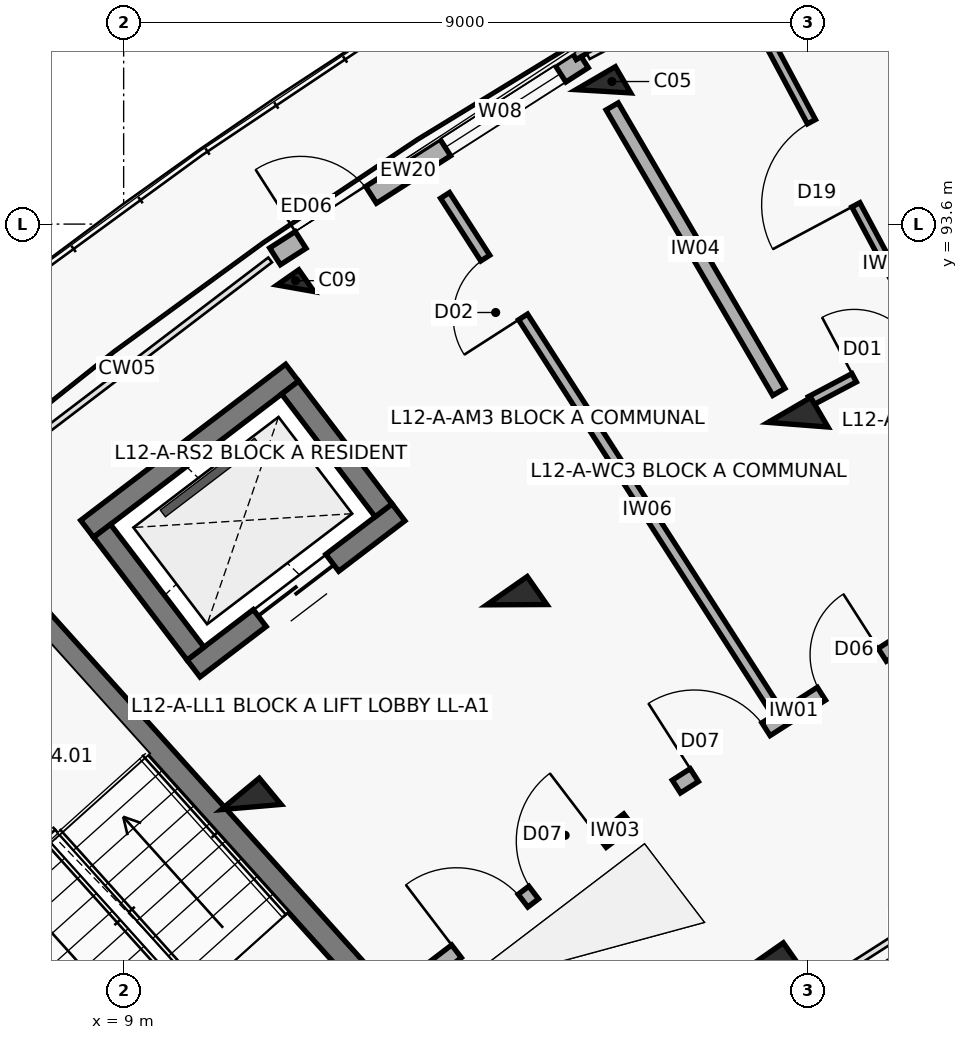
"""IFC4 building model, lengths in metres.
Left out: names, types, materials, properties, quantities, classifications, styles, units other than length and angle.
Written with IfcOpenShell. Run it as: python <this file> out.ifc"""

import sys

from ifc_helpers import new_model, si_unit, direction, frame, frame_2d, origin, origin_2d, place, context, subcontext, project, spatial, rectangle, extrude, element, fill, save


model = new_model("IFC4")
c1 = context("Model", 3, precision=1e-05, world=origin(), true_north=direction((0.0, 1.0)))
c2 = subcontext(c1, "Body", "Model", "MODEL_VIEW")
j1 = project(units=[si_unit("LENGTHUNIT", "METRE"), si_unit("PLANEANGLEUNIT", "RADIAN")], contexts=[c1])
p1 = place(None, origin())
s1 = spatial("IfcSite", under=j1, at=p1, CompositionType="ELEMENT")
p2 = place(p1, origin())
s2 = spatial("IfcBuilding", under=s1, at=p2, CompositionType="ELEMENT")
p3 = place(p2, frame((0.0, 0.0, 39.1)))
s3 = spatial("IfcBuildingStorey", under=s2, at=p3, CompositionType="ELEMENT", Elevation=39.1)
for number, where, z_axis, x_axis in (
    (1, (10.678, 85.93, 0.0), (0.0, 0.0, 1.0), (-0.638, 0.77, 0.0)),
    (2, (17.542, 83.773, 0.0), (0.0, 0.0, 1.0), (-0.573, 0.82, 0.0)),
    (3, (14.172, 88.592, 0.0), (0.0, 0.0, 1.0), (-0.573, 0.82, 0.0)),
):
    element("IfcColumn", number, at=place(p3, frame(where, z_axis=z_axis, x_axis=x_axis)), inside=s3, PredefinedType="COLUMN", context=c2, shape_type="SweptSolid", body=[
        extrude(rectangle(XDim=0.45, YDim=0.65, at=origin_2d()), origin(), (0.0, 0.0, 1.0), 3.1),
    ])
p4 = place(p3, frame((11.261, 92.755, 0.0), z_axis=(0.0, 0.0, 1.0), x_axis=(-0.573004420611, 0.819552276527, 0.0)))
e4 = element("IfcColumn", 4, at=p4, inside=s3, PredefinedType="COLUMN", context=c2, shape_type="SweptSolid", body=[
    extrude(rectangle(XDim=0.35, YDim=0.35, at=origin_2d()), origin(), (0.0, 0.0, 1.0), 3.1),
])
p5 = place(p3, frame((17.873, 90.96, 0.0), z_axis=(0.0, 0.0, 1.0), x_axis=(-0.504226211181, 0.863571611366, 0.0)))
e5 = element("IfcColumn", 5, at=p5, inside=s3, PredefinedType="COLUMN", context=c2, shape_type="SweptSolid", body=[
    extrude(rectangle(XDim=0.45, YDim=0.65, at=origin_2d()), origin(), (0.0, 0.0, 1.0), 3.1),
])
p6 = place(p3, frame((15.311, 95.347, 0.0), z_axis=(0.0, 0.0, 1.0), x_axis=(-0.504226211181, 0.863571611366, 0.0)))
e6 = element("IfcColumn", 6, at=p6, inside=s3, PredefinedType="COLUMN", context=c2, shape_type="SweptSolid", body=[
    extrude(rectangle(XDim=0.4, YDim=0.6, at=origin_2d()), origin(), (0.0, 0.0, 1.0), 3.1),
])
p7 = place(p3, frame((10.992, 93.176, 0.0), z_axis=(0.0, 0.0, 1.0), x_axis=(0.84226218024, 0.539068103061, 0.0)))
e7 = element("IfcWall", 7, at=p7, inside=s3, PredefinedType="SOLIDWALL", context=c2, shape_type="SweptSolid", body=[
    extrude(rectangle(XDim=4.809, YDim=0.262, at=frame_2d((2.404, 0.0))), origin(), (0.0, 0.0, 1.0), 2.25),
])
p8 = place(p7, frame((0.4, 0.0, 0.0)))
e8 = element("IfcOpeningElement", 8, at=p8, cuts=e7, PredefinedType="OPENING", context=c2, shape_type="SweptSolid", body=[
    extrude(rectangle(XDim=1.1, YDim=2.15, at=frame_2d((0.55, 1.075))), frame((0.0, 0.141, 0.0), z_axis=(0.0, -1.0, 0.0), x_axis=(1.0, 0.0, 0.0)), (0.0, 0.0, 1.0), 0.282),
])
p9 = place(p7, frame((2.659, 0.0, 0.35)))
e9 = element("IfcOpeningElement", 9, at=p9, cuts=e7, PredefinedType="OPENING", context=c2, shape_type="SweptSolid", body=[
    extrude(rectangle(XDim=1.8, YDim=1.65, at=frame_2d((0.9, 0.825))), frame((0.0, 0.141, 0.0), z_axis=(0.0, -1.0, 0.0), x_axis=(1.0, 0.0, 0.0)), (0.0, 0.0, 1.0), 0.282),
])
p10 = place(p3, frame((15.039, 95.813, 0.0), z_axis=(0.0, 0.0, 1.0), x_axis=(-0.504228145431, 0.863570481985, 0.0)))
e10 = element("IfcWall", 10, at=p10, inside=s3, PredefinedType="PARAPET", context=c2, shape_type="SweptSolid", body=[
    extrude(rectangle(XDim=1.53, YDim=0.195, at=frame_2d((0.765, 0.0))), origin(), (0.0, 0.0, 1.0), 2.25),
])
p11 = place(p3, frame((12.345, 83.461, 0.0), z_axis=(0.0, 0.0, 1.0), x_axis=(-0.668868253964, 0.743380964808, 0.0)))
e11 = element("IfcWall", 11, at=p11, inside=s3, PredefinedType="SHEAR", context=c2, shape_type="SweptSolid", body=[
    extrude(rectangle(XDim=7.69, YDim=0.3, at=frame_2d((3.845, 0.0))), origin(), (0.0, 0.0, 1.0), 3.1),
])
p12 = place(p3, frame((9.691, 81.073, 0.0), z_axis=(0.0, 0.0, 1.0), x_axis=(-0.668885797871, 0.743365179038, 0.0)))
e12 = element("IfcWall", 12, at=p12, inside=s3, PredefinedType="SHEAR", context=c2, shape_type="SweptSolid", body=[
    extrude(rectangle(XDim=7.69, YDim=0.3, at=frame_2d((3.845, 0.0))), origin(), (0.0, 0.0, 1.0), 3.1),
])
p13 = place(p3, frame((12.616, 89.807, 0.0), z_axis=(0.0, 0.0, 1.0), x_axis=(-0.795474703455, -0.605986795371, 0.0)))
e13 = element("IfcWall", 13, at=p13, inside=s3, PredefinedType="SHEAR", context=c2, shape_type="SweptSolid", body=[
    extrude(rectangle(XDim=3.39, YDim=0.28, at=frame_2d((1.695, 0.0))), origin(), (0.0, 0.0, 1.0), 3.1),
])
p14 = place(p13, frame((1.095, 0.0, 0.0)))
e14 = element("IfcOpeningElement", 14, at=p14, cuts=e13, PredefinedType="OPENING", context=c2, shape_type="SweptSolid", body=[
    extrude(rectangle(XDim=1.2, YDim=2.15, at=frame_2d((0.6, 1.075))), frame((0.0, 0.15, 0.0), z_axis=(0.0, -1.0, 0.0), x_axis=(1.0, 0.0, 0.0)), (0.0, 0.0, 1.0), 0.3),
])
p15 = place(p3, frame((11.216, 91.645, 0.0), z_axis=(0.0, 0.0, 1.0), x_axis=(-0.795439986025, -0.606032365994, 0.0)))
e15 = element("IfcWall", 15, at=p15, inside=s3, PredefinedType="SHEAR", context=c2, shape_type="SweptSolid", body=[
    extrude(rectangle(XDim=3.39, YDim=0.28, at=frame_2d((1.695, 0.0))), origin(), (0.0, 0.0, 1.0), 3.1),
])
p16 = place(p3, frame((12.42, 89.834, 0.0), z_axis=(0.0, 0.0, 1.0), x_axis=(-0.605948992168, 0.795503500238, 0.0)))
e16 = element("IfcWall", 16, at=p16, inside=s3, PredefinedType="SHEAR", context=c2, shape_type="SweptSolid", body=[
    extrude(rectangle(XDim=2.03, YDim=0.28, at=frame_2d((1.015, 0.0))), origin(), (0.0, 0.0, 1.0), 3.1),
])
p17 = place(p3, frame((9.946, 87.949, 0.0), z_axis=(0.0, 0.0, 1.0), x_axis=(-0.605891019062, 0.795547656033, 0.0)))
e17 = element("IfcWall", 17, at=p17, inside=s3, PredefinedType="SHEAR", context=c2, shape_type="SweptSolid", body=[
    extrude(rectangle(XDim=2.03, YDim=0.28, at=frame_2d((1.015, 0.0))), origin(), (0.0, 0.0, 1.0), 3.1),
])
p18 = place(p3, frame((13.021, 83.759, 0.0), z_axis=(0.0, 0.0, 1.0), x_axis=(0.795498026433, 0.605956178235, 0.0)))
e18 = element("IfcWall", 18, at=p18, inside=s3, PredefinedType="SOLIDWALL", context=c2, shape_type="SweptSolid", body=[
    extrude(rectangle(XDim=3.296, YDim=0.21, at=frame_2d((1.648, 0.0))), origin(), (0.0, 0.0, 1.0), 2.08),
])
p19 = place(p18, frame((0.45, 0.0, 0.0)))
e19 = element("IfcOpeningElement", 19, at=p19, cuts=e18, PredefinedType="OPENING", context=c2, shape_type="SweptSolid", body=[
    extrude(rectangle(XDim=1.1, YDim=2.15, at=frame_2d((0.55, 1.075))), frame((0.0, 0.115, 0.0), z_axis=(0.0, -1.0, 0.0), x_axis=(1.0, 0.0, 0.0)), (0.0, 0.0, 1.0), 0.23),
])
p20 = place(p18, frame((1.726, 0.0, 0.0)))
e20 = element("IfcOpeningElement", 20, at=p20, cuts=e18, PredefinedType="OPENING", context=c2, shape_type="SweptSolid", body=[
    extrude(rectangle(XDim=1.12, YDim=2.15, at=frame_2d((0.56, 1.075))), frame((0.0, 0.115, 0.0), z_axis=(0.0, -1.0, 0.0), x_axis=(1.0, 0.0, 0.0)), (0.0, 0.0, 1.0), 0.23),
])
p21 = place(p3, frame((16.272, 86.199, 0.0), z_axis=(0.0, 0.0, 1.0), x_axis=(0.842257205985, 0.539075874963, 0.0)))
e21 = element("IfcWall", 21, at=p21, inside=s3, PredefinedType="SOLIDWALL", context=c2, shape_type="SweptSolid", body=[
    extrude(rectangle(XDim=3.436, YDim=0.2, at=frame_2d((1.718, 0.0))), origin(), (0.0, 0.0, 1.0), 2.08),
])
p22 = place(p21, frame((0.28, 0.0, 0.0)))
e22 = element("IfcOpeningElement", 22, at=p22, cuts=e21, PredefinedType="OPENING", context=c2, shape_type="SweptSolid", body=[
    extrude(rectangle(XDim=1.12, YDim=2.15, at=frame_2d((0.56, 1.075))), frame((0.0, 0.11, 0.0), z_axis=(0.0, -1.0, 0.0), x_axis=(1.0, 0.0, 0.0)), (0.0, 0.0, 1.0), 0.22),
])
p23 = place(p21, frame((2.266, 0.0, 0.0)))
e23 = element("IfcOpeningElement", 23, at=p23, cuts=e21, PredefinedType="OPENING", context=c2, shape_type="SweptSolid", body=[
    extrude(rectangle(XDim=0.95, YDim=2.1, at=frame_2d((0.475, 1.05))), frame((0.0, 0.11, 0.0), z_axis=(0.0, -1.0, 0.0), x_axis=(1.0, 0.0, 0.0)), (0.0, 0.0, 1.0), 0.22),
])
p24 = place(p3, frame((17.524, 87.288, 0.0), z_axis=(0.0, 0.0, 1.0), x_axis=(-0.540338452216, 0.841447774408, 0.0)))
e24 = element("IfcWall", 24, at=p24, inside=s3, PredefinedType="PARTITIONING", context=c2, shape_type="SweptSolid", body=[
    extrude(rectangle(XDim=7.95, YDim=0.14, at=frame_2d((3.975, 0.0))), origin(), (0.0, 0.0, 1.0), 2.08),
])
p25 = place(p24, frame((6.05, 0.0, 0.0)))
e25 = element("IfcOpeningElement", 25, at=p25, cuts=e24, PredefinedType="OPENING", context=c2, shape_type="SweptSolid", body=[
    extrude(rectangle(XDim=0.92, YDim=2.1, at=frame_2d((0.46, 1.05))), frame((0.0, 0.08, 0.0), z_axis=(0.0, -1.0, 0.0), x_axis=(1.0, 0.0, 0.0)), (0.0, 0.0, 1.0), 0.16),
])
p26 = place(p3, frame((18.037, 91.273, 0.0), z_axis=(0.0, 0.0, 1.0), x_axis=(0.883441603894, 0.468541281543, 0.0)))
e26 = element("IfcWall", 26, at=p26, inside=s3, PredefinedType="PARTITIONING", context=c2, shape_type="SweptSolid", body=[
    extrude(rectangle(XDim=3.81, YDim=0.125, at=frame_2d((1.905, 0.0))), origin(), (0.0, 0.0, 1.0), 2.08),
])
p27 = place(p26, frame((0.65, 0.0, 0.0)))
e27 = element("IfcOpeningElement", 27, at=p27, cuts=e26, PredefinedType="OPENING", context=c2, shape_type="SweptSolid", body=[
    extrude(rectangle(XDim=0.9, YDim=2.1, at=frame_2d((0.45, 1.05))), frame((0.0, 0.073, 0.0), z_axis=(0.0, -1.0, 0.0), x_axis=(1.0, 0.0, 0.0)), (0.0, 0.0, 1.0), 0.145),
])
p28 = place(p26, frame((2.28, 0.0, 0.0)))
e28 = element("IfcOpeningElement", 28, at=p28, cuts=e26, PredefinedType="OPENING", context=c2, shape_type="SweptSolid", body=[
    extrude(rectangle(XDim=0.88, YDim=2.1, at=frame_2d((0.44, 1.05))), frame((0.0, 0.073, 0.0), z_axis=(0.0, -1.0, 0.0), x_axis=(1.0, 0.0, 0.0)), (0.0, 0.0, 1.0), 0.145),
])
p29 = place(p3, frame((19.46, 92.306, 0.0), z_axis=(0.0, 0.0, 1.0), x_axis=(-0.471228378949, 0.88201123285, 0.0)))
e29 = element("IfcWall", 29, at=p29, inside=s3, PredefinedType="PARTITIONING", context=c2, shape_type="SweptSolid", body=[
    extrude(rectangle(XDim=4.75, YDim=0.12, at=frame_2d((2.375, 0.0))), origin(), (0.0, 0.0, 1.0), 2.08),
])
p30 = place(p29, frame((1.755, 0.0, 0.0)))
e30 = element("IfcOpeningElement", 30, at=p30, cuts=e29, PredefinedType="OPENING", context=c2, shape_type="SweptSolid", body=[
    extrude(rectangle(XDim=1.24, YDim=2.1, at=frame_2d((0.62, 1.05))), frame((0.0, 0.07, 0.0), z_axis=(0.0, -1.0, 0.0), x_axis=(1.0, 0.0, 0.0)), (0.0, 0.0, 1.0), 0.14),
])
p31 = place(p3, frame((17.621, 91.392, 0.0), z_axis=(0.0, 0.0, 1.0), x_axis=(-0.504216452091, 0.863577309475, 0.0)))
e31 = element("IfcWall", 31, at=p31, inside=s3, PredefinedType="SOLIDWALL", context=c2, shape_type="SweptSolid", body=[
    extrude(rectangle(XDim=4.35, YDim=0.185, at=frame_2d((2.175, 0.0))), origin(), (0.0, 0.0, 1.0), 2.08),
])
p32 = place(p8, origin())
e32 = element("IfcDoor", 32, at=p32, inside=s3, OperationType="SINGLE_SWING_LEFT", PredefinedType="DOOR", context=c2, shape_type="SweptSolid", body=[
    extrude(rectangle(XDim=1.1, YDim=2.15, at=frame_2d((0.55, 1.075))), frame((0.0, 0.025, 0.0), z_axis=(0.0, -1.0, 0.0), x_axis=(1.0, 0.0, 0.0)), (0.0, 0.0, 1.0), 0.05),
])
fill(e8, e32)
p33 = place(p9, origin())
e33 = element("IfcWindow", 33, at=p33, inside=s3, PartitioningType="TRIPLE_PANEL_VERTICAL", PredefinedType="WINDOW", context=c2, shape_type="SweptSolid", body=[
    extrude(rectangle(XDim=1.8, YDim=1.65, at=frame_2d((0.9, 0.825))), frame((0.0, 0.03, 0.0), z_axis=(0.0, -1.0, 0.0), x_axis=(1.0, 0.0, 0.0)), (0.0, 0.0, 1.0), 0.06),
])
fill(e9, e33)
p34 = place(p14, origin())
e34 = element("IfcDoor", 34, at=p34, inside=s3, OperationType="DOUBLE_DOOR_SLIDING", PredefinedType="DOOR", context=c2, shape_type="SweptSolid", body=[
    extrude(rectangle(XDim=1.2, YDim=2.15, at=frame_2d((0.6, 1.075))), frame((0.0, 0.025, 0.0), z_axis=(0.0, -1.0, 0.0), x_axis=(1.0, 0.0, 0.0)), (0.0, 0.0, 1.0), 0.05),
])
fill(e14, e34)
p35 = place(p19, origin())
e35 = element("IfcDoor", 35, at=p35, inside=s3, OperationType="SINGLE_SWING_LEFT", PredefinedType="DOOR", context=c2, shape_type="SweptSolid", body=[
    extrude(rectangle(XDim=1.1, YDim=2.15, at=frame_2d((0.55, 1.075))), frame((0.0, 0.025, 0.0), z_axis=(0.0, -1.0, 0.0), x_axis=(1.0, 0.0, 0.0)), (0.0, 0.0, 1.0), 0.05),
])
fill(e19, e35)
p36 = place(p20, origin())
e36 = element("IfcDoor", 36, at=p36, inside=s3, OperationType="SINGLE_SWING_RIGHT", PredefinedType="DOOR", context=c2, shape_type="SweptSolid", body=[
    extrude(rectangle(XDim=1.12, YDim=2.15, at=frame_2d((0.56, 1.075))), frame((0.0, 0.025, 0.0), z_axis=(0.0, -1.0, 0.0), x_axis=(1.0, 0.0, 0.0)), (0.0, 0.0, 1.0), 0.05),
])
fill(e20, e36)
p37 = place(p22, origin())
e37 = element("IfcDoor", 37, at=p37, inside=s3, OperationType="SINGLE_SWING_LEFT", PredefinedType="DOOR", context=c2, shape_type="SweptSolid", body=[
    extrude(rectangle(XDim=1.12, YDim=2.15, at=frame_2d((0.56, 1.075))), frame((0.0, 0.025, 0.0), z_axis=(0.0, -1.0, 0.0), x_axis=(1.0, 0.0, 0.0)), (0.0, 0.0, 1.0), 0.05),
])
fill(e22, e37)
p38 = place(p23, origin())
e38 = element("IfcDoor", 38, at=p38, inside=s3, OperationType="SINGLE_SWING_RIGHT", PredefinedType="DOOR", context=c2, shape_type="SweptSolid", body=[
    extrude(rectangle(XDim=0.95, YDim=2.1, at=frame_2d((0.475, 1.05))), frame((0.0, 0.025, 0.0), z_axis=(0.0, -1.0, 0.0), x_axis=(1.0, 0.0, 0.0)), (0.0, 0.0, 1.0), 0.05),
])
fill(e23, e38)
p39 = place(p25, origin())
e39 = element("IfcDoor", 39, at=p39, inside=s3, OperationType="SINGLE_SWING_LEFT", PredefinedType="DOOR", context=c2, shape_type="SweptSolid", body=[
    extrude(rectangle(XDim=0.92, YDim=2.1, at=frame_2d((0.46, 1.05))), frame((0.0, 0.025, 0.0), z_axis=(0.0, -1.0, 0.0), x_axis=(1.0, 0.0, 0.0)), (0.0, 0.0, 1.0), 0.05),
])
fill(e25, e39)
p40 = place(p27, origin())
e40 = element("IfcDoor", 40, at=p40, inside=s3, OperationType="SINGLE_SWING_LEFT", PredefinedType="DOOR", context=c2, shape_type="SweptSolid", body=[
    extrude(rectangle(XDim=0.9, YDim=2.1, at=frame_2d((0.45, 1.05))), frame((0.0, 0.025, 0.0), z_axis=(0.0, -1.0, 0.0), x_axis=(1.0, 0.0, 0.0)), (0.0, 0.0, 1.0), 0.05),
])
fill(e27, e40)
p41 = place(p30, origin())
e41 = element("IfcDoor", 41, at=p41, inside=s3, OperationType="SINGLE_SWING_LEFT", PredefinedType="DOOR", context=c2, shape_type="SweptSolid", body=[
    extrude(rectangle(XDim=1.24, YDim=2.1, at=frame_2d((0.62, 1.05))), frame((0.0, 0.025, 0.0), z_axis=(0.0, -1.0, 0.0), x_axis=(1.0, 0.0, 0.0)), (0.0, 0.0, 1.0), 0.05),
])
fill(e30, e41)
save(model, sys.argv[1])
